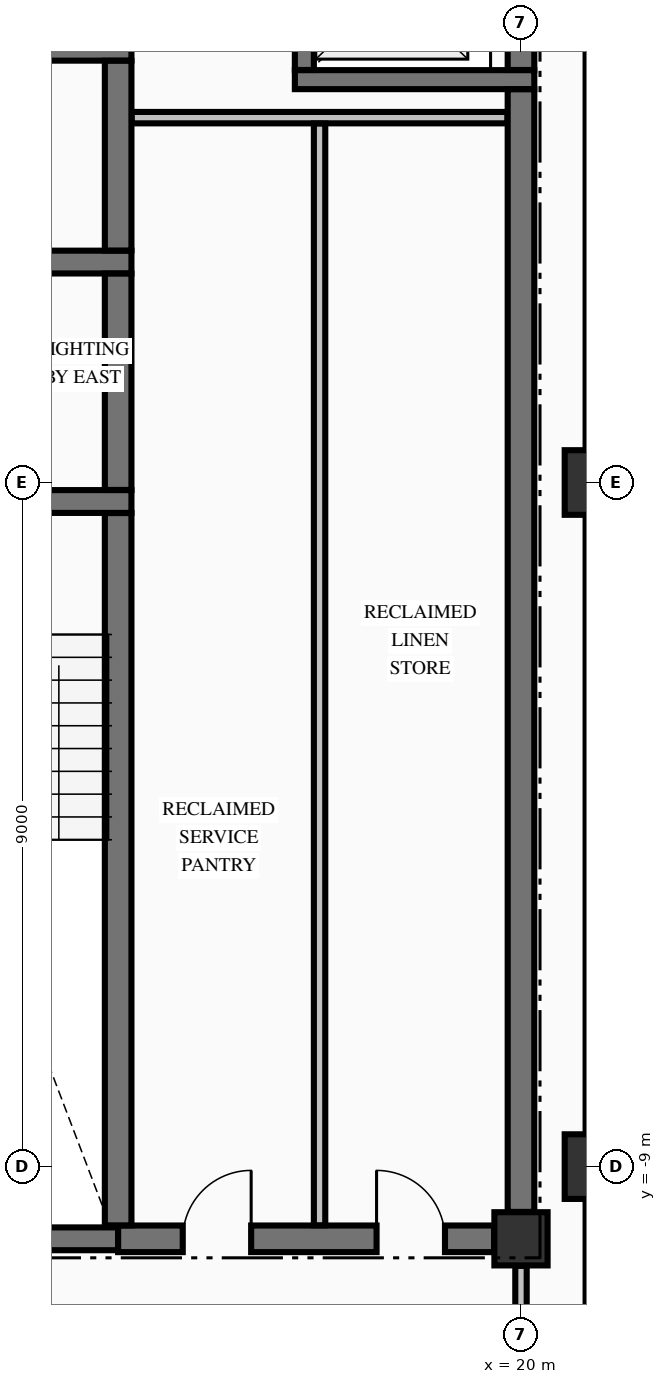
"""IFC4 building model, lengths in metres.
Left out: names, types, materials, properties, quantities, classifications, styles, units other than length and angle.
Written with IfcOpenShell. Run it as: python <this file> out.ifc"""

import sys

from ifc_helpers import new_model, si_unit, direction, frame, frame_2d, origin, origin_2d, place, context, subcontext, project, spatial, rectangle, extrude, element, fill, save


model = new_model("IFC4")
c1 = context("Model", 3, precision=1e-05, world=origin(), true_north=direction((0.0, 1.0)))
c2 = subcontext(c1, "Body", "Model", "MODEL_VIEW")
j1 = project(units=[si_unit("LENGTHUNIT", "METRE"), si_unit("PLANEANGLEUNIT", "RADIAN")], contexts=[c1])
p1 = place(None, origin())
s1 = spatial("IfcSite", under=j1, at=p1, CompositionType="ELEMENT")
p2 = place(p1, origin())
s2 = spatial("IfcBuilding", under=s1, at=p2, CompositionType="ELEMENT")
p3 = place(p2, frame((0.0, 0.0, 267.35)))
s3 = spatial("IfcBuildingStorey", under=s2, at=p3, CompositionType="ELEMENT", Elevation=267.35)
for number, where, z_axis, x_axis in (
    (1, (21.0, -9.0, -0.25), (0.0, 0.0, 1.0), (1.0, 0.0, 0.0)),
    (2, (21.0, 0.0, -0.25), (0.0, 0.0, 1.0), (1.0, 0.0, 0.0)),
):
    element("IfcColumn", number, at=place(p3, frame(where, z_axis=z_axis, x_axis=x_axis)), inside=s3, PredefinedType="COLUMN", context=c2, shape_type="SweptSolid", body=[
        extrude(rectangle(XDim=0.85, YDim=0.85, at=origin_2d()), origin(), (0.0, 0.0, 1.0), 3.155),
    ])
p4 = place(p3, frame((20.0, -9.95, -0.25), z_axis=(0.0, 0.0, 1.0), x_axis=(1.0, 0.0, 0.0)))
e3 = element("IfcColumn", 3, at=p4, inside=s3, PredefinedType="COLUMN", context=c2, shape_type="SweptSolid", body=[
    extrude(rectangle(XDim=0.7, YDim=0.7, at=origin_2d()), origin(), (0.0, 0.0, 1.0), 3.155),
])
for number, where, z_axis, x_axis in (
    (4, (21.0, -17.545, 0.0), (0.0, 0.0, 1.0), (0.0, 1.0, 0.0)),
    (5, (21.0, -8.545, 0.0), (0.0, 0.0, 1.0), (0.0, 1.0, 0.0)),
    (6, (21.0, 0.455, 0.0), (0.0, 0.0, 1.0), (0.0, 1.0, 0.0)),
):
    element("IfcWall", number, at=place(p3, frame(where, z_axis=z_axis, x_axis=x_axis)), inside=s3, PredefinedType="STANDARD", context=c2, shape_type="SweptSolid", body=[
        extrude(rectangle(XDim=8.09, YDim=0.3, at=frame_2d((4.045, 0.0))), origin(), (0.0, 0.0, 1.0), 2.297),
    ])
p5 = place(p3, frame((11.354, -9.95, 0.0), z_axis=(0.0, 0.0, 1.0), x_axis=(1.0, 0.0, 0.0)))
e7 = element("IfcWall", 7, at=p5, inside=s3, PredefinedType="SHEAR", context=c2, shape_type="SweptSolid", body=[
    extrude(rectangle(XDim=3.346, YDim=0.3, at=frame_2d((1.673, 0.0))), origin(), (0.0, 0.0, 1.0), 2.905),
])
p6 = place(p3, frame((14.7, -9.95, 0.0), z_axis=(0.0, 0.0, 1.0), x_axis=(1.0, 0.0, 0.0)))
e8 = element("IfcWall", 8, at=p6, inside=s3, PredefinedType="SHEAR", context=c2, shape_type="SweptSolid", body=[
    extrude(rectangle(XDim=4.946, YDim=0.35, at=frame_2d((2.473, 0.0))), origin(), (0.0, 0.0, 1.0), 2.905),
])
p7 = place(p6, frame((0.85, 0.0, 0.0)))
e9 = element("IfcOpeningElement", 9, at=p7, cuts=e8, PredefinedType="OPENING", context=c2, shape_type="SweptSolid", body=[
    extrude(rectangle(XDim=0.9, YDim=2.15, at=frame_2d((0.45, 1.075))), frame((0.0, 0.185, 0.0), z_axis=(0.0, -1.0, 0.0), x_axis=(1.0, 0.0, 0.0)), (0.0, 0.0, 1.0), 0.37),
])
p8 = place(p6, frame((3.4, 0.0, 0.0)))
e10 = element("IfcOpeningElement", 10, at=p8, cuts=e8, PredefinedType="OPENING", context=c2, shape_type="SweptSolid", body=[
    extrude(rectangle(XDim=0.9, YDim=2.15, at=frame_2d((0.45, 1.075))), frame((0.0, 0.185, 0.0), z_axis=(0.0, -1.0, 0.0), x_axis=(1.0, 0.0, 0.0)), (0.0, 0.0, 1.0), 0.37),
])
p9 = place(p3, frame((11.354, -0.25, 0.0), z_axis=(0.0, 0.0, 1.0), x_axis=(1.0, 0.0, 0.0)))
e11 = element("IfcWall", 11, at=p9, inside=s3, PredefinedType="SHEAR", context=c2, shape_type="SweptSolid", body=[
    extrude(rectangle(XDim=3.521, YDim=0.3, at=frame_2d((1.76, 0.0))), origin(), (0.0, 0.0, 1.0), 2.905),
])
p10 = place(p9, frame((1.246, 0.0, 0.0)))
e12 = element("IfcOpeningElement", 12, at=p10, cuts=e11, PredefinedType="OPENING", context=c2, shape_type="SweptSolid", body=[
    extrude(rectangle(XDim=1.1, YDim=2.15, at=frame_2d((0.55, 1.075))), frame((0.0, 0.16, 0.0), z_axis=(0.0, -1.0, 0.0), x_axis=(1.0, 0.0, 0.0)), (0.0, 0.0, 1.0), 0.32),
])
p11 = place(p3, frame((10.85, 2.9, 0.0), z_axis=(0.0, 0.0, 1.0), x_axis=(1.0, 0.0, 0.0)))
e13 = element("IfcWall", 13, at=p11, inside=s3, PredefinedType="SHEAR", context=c2, shape_type="SweptSolid", body=[
    extrude(rectangle(XDim=4.025, YDim=0.3, at=frame_2d((2.012, 0.0))), origin(), (0.0, 0.0, 1.0), 2.905),
])
p12 = place(p11, frame((0.85, 0.0, 0.0)))
e14 = element("IfcOpeningElement", 14, at=p12, cuts=e13, PredefinedType="OPENING", context=c2, shape_type="SweptSolid", body=[
    extrude(rectangle(XDim=1.1, YDim=2.2, at=frame_2d((0.55, 1.1))), frame((0.0, 0.16, 0.0), z_axis=(0.0, -1.0, 0.0), x_axis=(1.0, 0.0, 0.0)), (0.0, 0.0, 1.0), 0.32),
])
p13 = place(p3, frame((17.025, 5.3, 0.0), z_axis=(0.0, 0.0, 1.0), x_axis=(1.0, 0.0, 0.0)))
e15 = element("IfcWall", 15, at=p13, inside=s3, PredefinedType="SOLIDWALL", context=c2, shape_type="SweptSolid", body=[
    extrude(rectangle(XDim=3.15, YDim=0.25, at=frame_2d((1.575, 0.0))), origin(), (0.0, 0.0, 1.0), 2.905),
])
p14 = place(p3, frame((10.85, 5.7, 0.0), z_axis=(0.0, 0.0, 1.0), x_axis=(1.0, 0.0, 0.0)))
e16 = element("IfcWall", 16, at=p14, inside=s3, PredefinedType="SHEAR", context=c2, shape_type="SweptSolid", body=[
    extrude(rectangle(XDim=4.025, YDim=0.3, at=frame_2d((2.012, 0.0))), origin(), (0.0, 0.0, 1.0), 2.905),
])
p15 = place(p3, frame((14.878, 4.8, 0.0), z_axis=(0.0, 0.0, 1.0), x_axis=(1.0, 0.0, 0.0)))
e17 = element("IfcWall", 17, at=p15, inside=s3, PredefinedType="PARTITIONING", context=c2, shape_type="SweptSolid", body=[
    extrude(rectangle(XDim=4.944, YDim=0.15, at=frame_2d((2.472, 0.0))), origin(), (0.0, 0.0, 1.0), 2.905),
])
p16 = place(p3, frame((14.7, -9.773, 0.0), z_axis=(0.0, 0.0, 1.0), x_axis=(0.0, 1.0, 0.0)))
e18 = element("IfcWall", 18, at=p16, inside=s3, PredefinedType="SHEAR", context=c2, shape_type="SweptSolid", body=[
    extrude(rectangle(XDim=9.371, YDim=0.35, at=frame_2d((4.686, 0.0))), origin(), (0.0, 0.0, 1.0), 2.905),
])
p17 = place(p3, frame((14.7, -0.098, 0.0), z_axis=(0.0, 0.0, 1.0), x_axis=(0.0, 1.0, 0.0)))
e19 = element("IfcWall", 19, at=p17, inside=s3, PredefinedType="SHEAR", context=c2, shape_type="SweptSolid", body=[
    extrude(rectangle(XDim=2.846, YDim=0.35, at=frame_2d((1.423, 0.0))), origin(), (0.0, 0.0, 1.0), 2.905),
])
p18 = place(p3, frame((14.7, 3.052, 0.0), z_axis=(0.0, 0.0, 1.0), x_axis=(0.0, 1.0, 0.0)))
e20 = element("IfcWall", 20, at=p18, inside=s3, PredefinedType="SHEAR", context=c2, shape_type="SweptSolid", body=[
    extrude(rectangle(XDim=2.496, YDim=0.35, at=frame_2d((1.248, 0.0))), origin(), (0.0, 0.0, 1.0), 2.905),
])
p19 = place(p3, frame((17.15, 5.427, 0.0), z_axis=(0.0, 0.0, 1.0), x_axis=(0.0, 1.0, 0.0)))
e21 = element("IfcWall", 21, at=p19, inside=s3, PredefinedType="SOLIDWALL", context=c2, shape_type="SweptSolid", body=[
    extrude(rectangle(XDim=2.196, YDim=0.25, at=frame_2d((1.098, 0.0))), origin(), (0.0, 0.0, 1.0), 2.905),
])
p20 = place(p19, frame((0.548, 0.0, 0.0)))
e22 = element("IfcOpeningElement", 22, at=p20, cuts=e21, PredefinedType="OPENING", context=c2, shape_type="SweptSolid", body=[
    extrude(rectangle(XDim=1.1, YDim=2.2, at=frame_2d((0.55, 1.1))), frame((0.0, 0.135, 0.0), z_axis=(0.0, -1.0, 0.0), x_axis=(1.0, 0.0, 0.0)), (0.0, 0.0, 1.0), 0.27),
])
p21 = place(p3, frame((20.0, -9.596, 0.0), z_axis=(0.0, 0.0, 1.0), x_axis=(0.0, 1.0, 0.0)))
e23 = element("IfcWall", 23, at=p21, inside=s3, PredefinedType="SHEAR", context=c2, shape_type="SweptSolid", body=[
    extrude(rectangle(XDim=14.769, YDim=0.35, at=frame_2d((7.385, 0.0))), origin(), (0.0, 0.0, 1.0), 2.905),
])
p22 = place(p3, frame((20.0, 5.427, 0.0), z_axis=(0.0, 0.0, 1.0), x_axis=(0.0, 1.0, 0.0)))
e24 = element("IfcWall", 24, at=p22, inside=s3, PredefinedType="SHEAR", context=c2, shape_type="SweptSolid", body=[
    extrude(rectangle(XDim=2.196, YDim=0.35, at=frame_2d((1.098, 0.0))), origin(), (0.0, 0.0, 1.0), 2.905),
])
p23 = place(p3, frame((17.35, -9.772, 0.0), z_axis=(0.0, 0.0, 1.0), x_axis=(0.0, 1.0, 0.0)))
e25 = element("IfcWall", 25, at=p23, inside=s3, PredefinedType="PARTITIONING", context=c2, shape_type="SweptSolid", body=[
    extrude(rectangle(XDim=14.494, YDim=0.15, at=frame_2d((7.247, 0.0))), origin(), (0.0, 0.0, 1.0), 2.905),
])
p24 = place(p3, frame((20.0, -12.122, 0.0), z_axis=(0.0, 0.0, 1.0), x_axis=(0.0, 1.0, 0.0)))
e26 = element("IfcWall", 26, at=p24, inside=s3, PredefinedType="PARTITIONING", context=c2, shape_type="SweptSolid", body=[
    extrude(rectangle(XDim=1.816, YDim=0.15, at=frame_2d((0.908, 0.0))), origin(), (0.0, 0.0, 1.0), 2.495),
])
p25 = place(p7, origin())
e27 = element("IfcDoor", 27, at=p25, inside=s3, OperationType="SINGLE_SWING_RIGHT", PredefinedType="DOOR", context=c2, shape_type="SweptSolid", body=[
    extrude(rectangle(XDim=0.9, YDim=2.15, at=frame_2d((0.45, 1.075))), frame((0.0, 0.025, 0.0), z_axis=(0.0, -1.0, 0.0), x_axis=(1.0, 0.0, 0.0)), (0.0, 0.0, 1.0), 0.05),
])
fill(e9, e27)
p26 = place(p8, origin())
e28 = element("IfcDoor", 28, at=p26, inside=s3, OperationType="SINGLE_SWING_LEFT", PredefinedType="DOOR", context=c2, shape_type="SweptSolid", body=[
    extrude(rectangle(XDim=0.9, YDim=2.15, at=frame_2d((0.45, 1.075))), frame((0.0, 0.025, 0.0), z_axis=(0.0, -1.0, 0.0), x_axis=(1.0, 0.0, 0.0)), (0.0, 0.0, 1.0), 0.05),
])
fill(e10, e28)
save(model, sys.argv[1])
